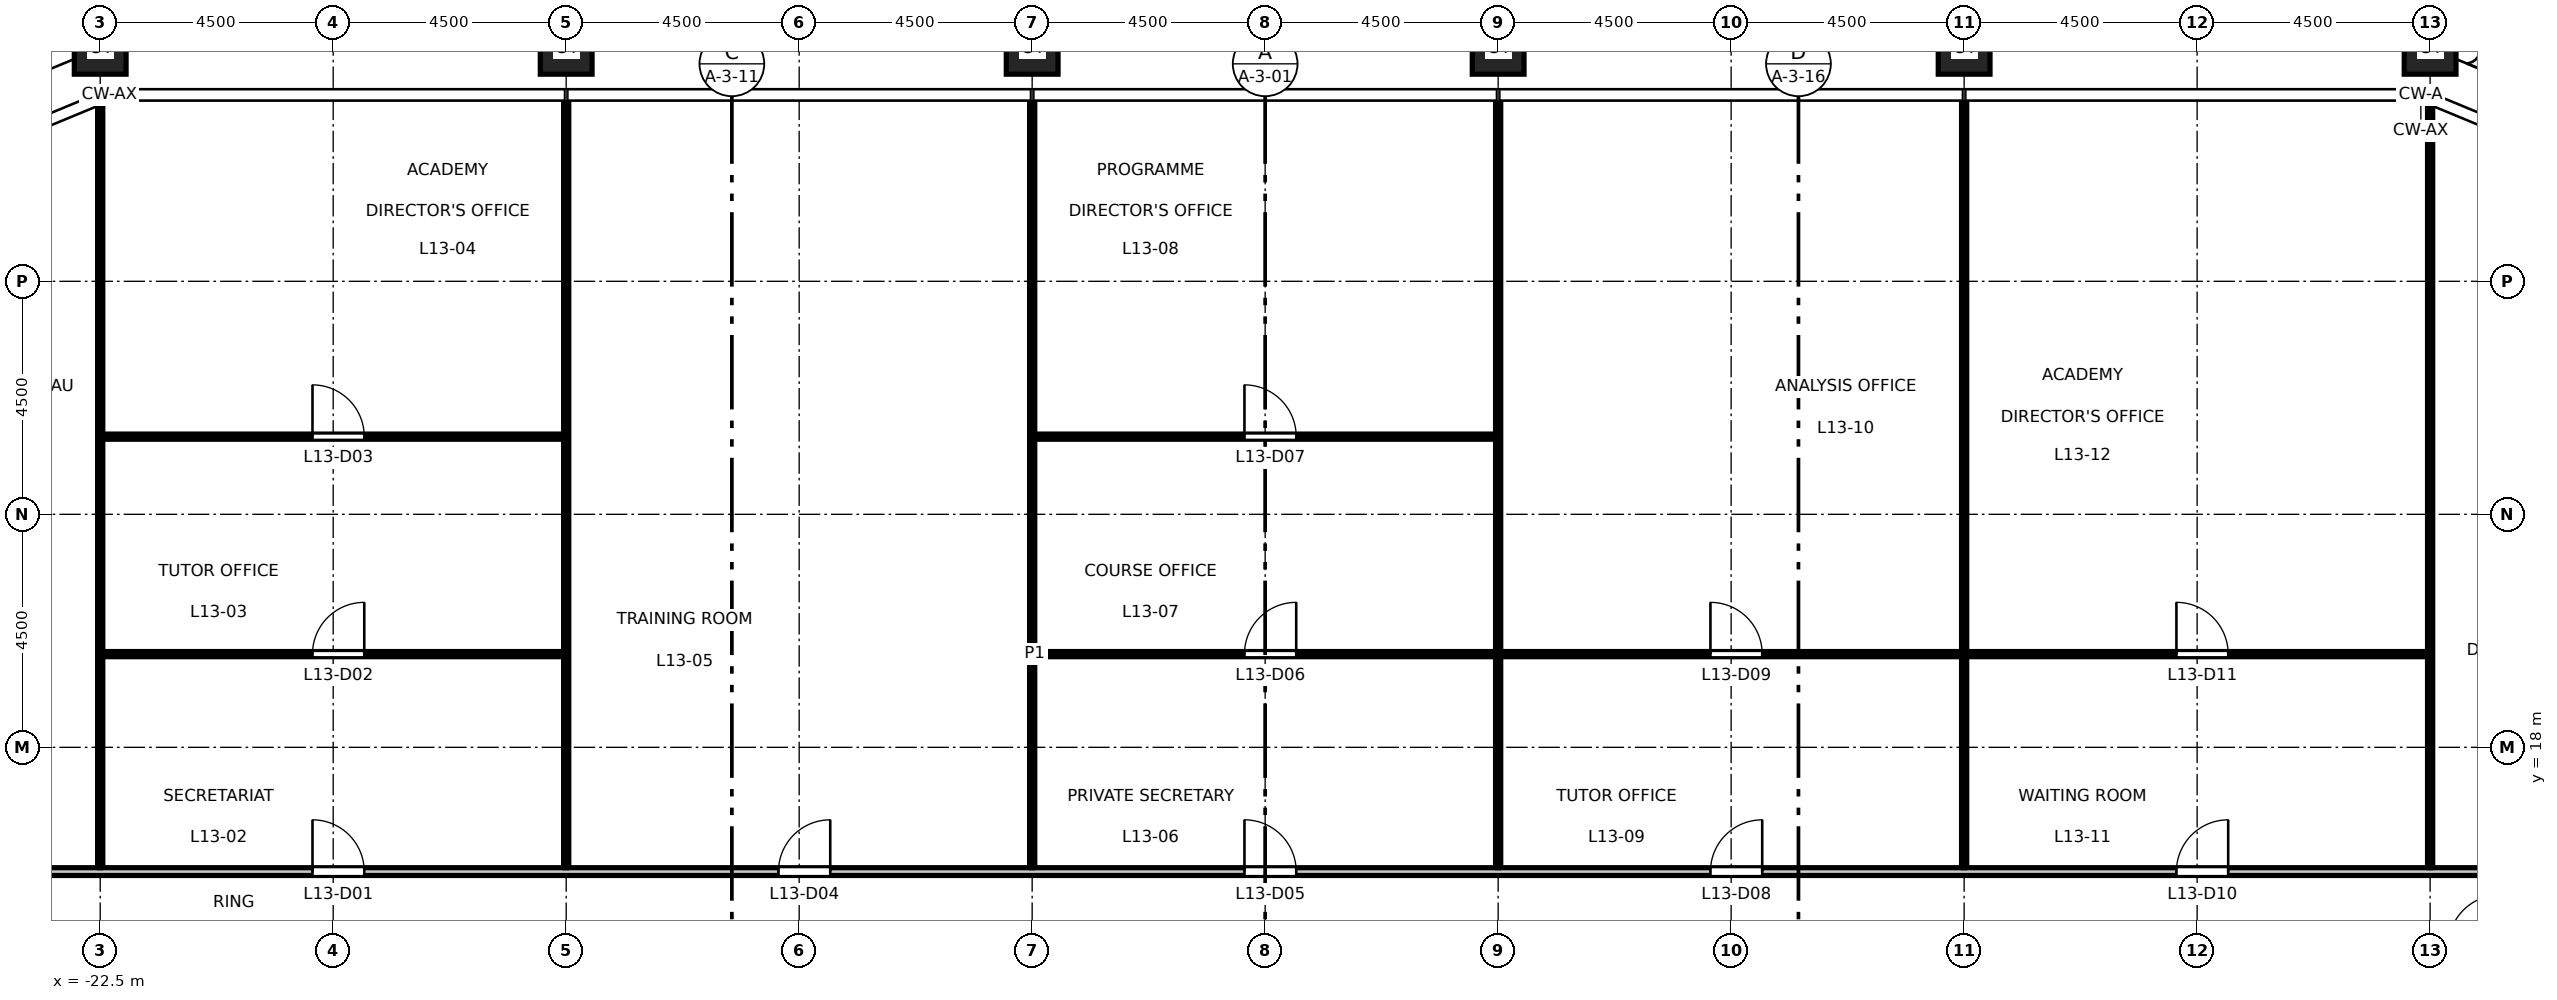
"""IFC4 building model, lengths in metres.
Left out: names, types, materials, properties, quantities, classifications, styles, units other than length and angle.
Written with IfcOpenShell. Run it as: python <this file> out.ifc"""

import sys

from ifc_helpers import new_model, si_unit, direction, frame, frame_2d, origin, origin_2d, place, context, subcontext, project, spatial, rectangle, hollow_rectangle, extrude, element, fill, save


model = new_model("IFC4")
c1 = context("Model", 3, precision=1e-05, world=origin(), true_north=direction((0.0, 1.0)))
c2 = subcontext(c1, "Body", "Model", "MODEL_VIEW")
j1 = project(units=[si_unit("LENGTHUNIT", "METRE"), si_unit("PLANEANGLEUNIT", "RADIAN")], contexts=[c1])
p1 = place(None, origin())
s1 = spatial("IfcSite", under=j1, at=p1, CompositionType="ELEMENT")
p2 = place(p1, origin())
s2 = spatial("IfcBuilding", under=s1, at=p2, CompositionType="ELEMENT")
p3 = place(p2, frame((0.0, 0.0, 62.7)))
s3 = spatial("IfcBuildingStorey", under=s2, at=p3, CompositionType="ELEMENT", Elevation=62.7)
for number, where, z_axis, x_axis in (
    (1, (22.5, 31.5, 0.0), (0.0, 0.0, 1.0), (1.0, 0.0, 0.0)),
    (2, (13.5, 31.5, 0.0), (0.0, 0.0, 1.0), (1.0, 0.0, 0.0)),
    (3, (4.5, 31.5, 0.0), (0.0, 0.0, 1.0), (1.0, 0.0, 0.0)),
    (4, (-4.5, 31.5, 0.0), (0.0, 0.0, 1.0), (1.0, 0.0, 0.0)),
    (5, (-13.5, 31.5, 0.0), (0.0, 0.0, 1.0), (1.0, 0.0, 0.0)),
    (6, (-22.5, 31.5, 0.0), (0.0, 0.0, 1.0), (1.0, 0.0, 0.0)),
):
    element("IfcColumn", number, at=place(p3, frame(where, z_axis=z_axis, x_axis=x_axis)), inside=s3, PredefinedType="COLUMN", context=c2, shape_type="SweptSolid", body=[
        extrude(hollow_rectangle(XDim=1.0, YDim=1.0, WallThickness=0.06, at=origin_2d()), origin(), (0.0, 0.0, 1.0), 4.5),
    ])
p4 = place(p3, frame((-23.925, 15.6, 0.0), z_axis=(0.0, 0.0, 1.0), x_axis=(1.0, 0.0, 0.0)))
e7 = element("IfcWall", 7, at=p4, inside=s3, PredefinedType="PARTITIONING", context=c2, shape_type="SweptSolid", body=[
    extrude(rectangle(XDim=47.85, YDim=0.15, at=frame_2d((23.925, 0.0))), origin(), (0.0, 0.0, 1.0), 4.35),
])
p5 = place(p4, frame((5.525, 0.0, 0.0)))
e8 = element("IfcOpeningElement", 8, at=p5, cuts=e7, PredefinedType="OPENING", context=c2, shape_type="SweptSolid", body=[
    extrude(rectangle(XDim=1.0, YDim=2.1, at=frame_2d((0.5, 1.05))), frame((0.0, 0.085, 0.0), z_axis=(0.0, -1.0, 0.0), x_axis=(1.0, 0.0, 0.0)), (0.0, 0.0, 1.0), 0.17),
])
p6 = place(p4, frame((14.525, 0.0, 0.0)))
e9 = element("IfcOpeningElement", 9, at=p6, cuts=e7, PredefinedType="OPENING", context=c2, shape_type="SweptSolid", body=[
    extrude(rectangle(XDim=1.0, YDim=2.1, at=frame_2d((0.5, 1.05))), frame((0.0, 0.085, 0.0), z_axis=(0.0, -1.0, 0.0), x_axis=(1.0, 0.0, 0.0)), (0.0, 0.0, 1.0), 0.17),
])
p7 = place(p4, frame((23.525, 0.0, 0.0)))
e10 = element("IfcOpeningElement", 10, at=p7, cuts=e7, PredefinedType="OPENING", context=c2, shape_type="SweptSolid", body=[
    extrude(rectangle(XDim=1.0, YDim=2.1, at=frame_2d((0.5, 1.05))), frame((0.0, 0.085, 0.0), z_axis=(0.0, -1.0, 0.0), x_axis=(1.0, 0.0, 0.0)), (0.0, 0.0, 1.0), 0.17),
])
p8 = place(p4, frame((32.525, 0.0, 0.0)))
e11 = element("IfcOpeningElement", 11, at=p8, cuts=e7, PredefinedType="OPENING", context=c2, shape_type="SweptSolid", body=[
    extrude(rectangle(XDim=1.0, YDim=2.1, at=frame_2d((0.5, 1.05))), frame((0.0, 0.085, 0.0), z_axis=(0.0, -1.0, 0.0), x_axis=(1.0, 0.0, 0.0)), (0.0, 0.0, 1.0), 0.17),
])
p9 = place(p4, frame((41.525, 0.0, 0.0)))
e12 = element("IfcOpeningElement", 12, at=p9, cuts=e7, PredefinedType="OPENING", context=c2, shape_type="SweptSolid", body=[
    extrude(rectangle(XDim=1.0, YDim=2.1, at=frame_2d((0.5, 1.05))), frame((0.0, 0.085, 0.0), z_axis=(0.0, -1.0, 0.0), x_axis=(1.0, 0.0, 0.0)), (0.0, 0.0, 1.0), 0.17),
])
p10 = place(p3, frame((-22.45, 19.8, 0.0), z_axis=(0.0, 0.0, 1.0), x_axis=(1.0, 0.0, 0.0)))
e13 = element("IfcWall", 13, at=p10, inside=s3, PredefinedType="PARTITIONING", context=c2, shape_type="SweptSolid", body=[
    extrude(rectangle(XDim=8.9, YDim=0.1, at=frame_2d((4.45, 0.0))), origin(), (0.0, 0.0, 1.0), 4.35),
])
p11 = place(p10, frame((4.05, 0.0, 0.0)))
e14 = element("IfcOpeningElement", 14, at=p11, cuts=e13, PredefinedType="OPENING", context=c2, shape_type="SweptSolid", body=[
    extrude(rectangle(XDim=1.0, YDim=2.1, at=frame_2d((0.5, 1.05))), frame((0.0, 0.06, 0.0), z_axis=(0.0, -1.0, 0.0), x_axis=(1.0, 0.0, 0.0)), (0.0, 0.0, 1.0), 0.12),
])
p12 = place(p3, frame((-4.45, 19.8, 0.0), z_axis=(0.0, 0.0, 1.0), x_axis=(1.0, 0.0, 0.0)))
e15 = element("IfcWall", 15, at=p12, inside=s3, PredefinedType="PARTITIONING", context=c2, shape_type="SweptSolid", body=[
    extrude(rectangle(XDim=26.9, YDim=0.1, at=frame_2d((13.45, 0.0))), origin(), (0.0, 0.0, 1.0), 4.35),
])
p13 = place(p12, frame((4.05, 0.0, 0.0)))
e16 = element("IfcOpeningElement", 16, at=p13, cuts=e15, PredefinedType="OPENING", context=c2, shape_type="SweptSolid", body=[
    extrude(rectangle(XDim=1.0, YDim=2.1, at=frame_2d((0.5, 1.05))), frame((0.0, 0.06, 0.0), z_axis=(0.0, -1.0, 0.0), x_axis=(1.0, 0.0, 0.0)), (0.0, 0.0, 1.0), 0.12),
])
p14 = place(p12, frame((13.05, 0.0, 0.0)))
e17 = element("IfcOpeningElement", 17, at=p14, cuts=e15, PredefinedType="OPENING", context=c2, shape_type="SweptSolid", body=[
    extrude(rectangle(XDim=1.0, YDim=2.1, at=frame_2d((0.5, 1.05))), frame((0.0, 0.06, 0.0), z_axis=(0.0, -1.0, 0.0), x_axis=(1.0, 0.0, 0.0)), (0.0, 0.0, 1.0), 0.12),
])
p15 = place(p12, frame((22.05, 0.0, 0.0)))
e18 = element("IfcOpeningElement", 18, at=p15, cuts=e15, PredefinedType="OPENING", context=c2, shape_type="SweptSolid", body=[
    extrude(rectangle(XDim=1.0, YDim=2.1, at=frame_2d((0.5, 1.05))), frame((0.0, 0.06, 0.0), z_axis=(0.0, -1.0, 0.0), x_axis=(1.0, 0.0, 0.0)), (0.0, 0.0, 1.0), 0.12),
])
p16 = place(p3, frame((-22.45, 24.0, 0.0), z_axis=(0.0, 0.0, 1.0), x_axis=(1.0, 0.0, 0.0)))
e19 = element("IfcWall", 19, at=p16, inside=s3, PredefinedType="PARTITIONING", context=c2, shape_type="SweptSolid", body=[
    extrude(rectangle(XDim=8.9, YDim=0.1, at=frame_2d((4.45, 0.0))), origin(), (0.0, 0.0, 1.0), 3.85),
])
p17 = place(p16, frame((4.05, 0.0, 0.0)))
e20 = element("IfcOpeningElement", 20, at=p17, cuts=e19, PredefinedType="OPENING", context=c2, shape_type="SweptSolid", body=[
    extrude(rectangle(XDim=1.0, YDim=2.1, at=frame_2d((0.5, 1.05))), frame((0.0, 0.06, 0.0), z_axis=(0.0, -1.0, 0.0), x_axis=(1.0, 0.0, 0.0)), (0.0, 0.0, 1.0), 0.12),
])
p18 = place(p3, frame((-4.45, 24.0, 0.0), z_axis=(0.0, 0.0, 1.0), x_axis=(1.0, 0.0, 0.0)))
e21 = element("IfcWall", 21, at=p18, inside=s3, PredefinedType="PARTITIONING", context=c2, shape_type="SweptSolid", body=[
    extrude(rectangle(XDim=8.9, YDim=0.1, at=frame_2d((4.45, 0.0))), origin(), (0.0, 0.0, 1.0), 3.85),
])
p19 = place(p18, frame((4.05, 0.0, 0.0)))
e22 = element("IfcOpeningElement", 22, at=p19, cuts=e21, PredefinedType="OPENING", context=c2, shape_type="SweptSolid", body=[
    extrude(rectangle(XDim=1.0, YDim=2.1, at=frame_2d((0.5, 1.05))), frame((0.0, 0.06, 0.0), z_axis=(0.0, -1.0, 0.0), x_axis=(1.0, 0.0, 0.0)), (0.0, 0.0, 1.0), 0.12),
])
p20 = place(p3, frame((-22.5, 15.675, 0.0), z_axis=(0.0, 0.0, 1.0), x_axis=(0.0, 1.0, 0.0)))
e23 = element("IfcWall", 23, at=p20, inside=s3, PredefinedType="PARTITIONING", context=c2, shape_type="SweptSolid", body=[
    extrude(rectangle(XDim=14.753, YDim=0.1, at=frame_2d((7.376, 0.0))), origin(), (0.0, 0.0, 1.0), 3.35),
])
for number, where, z_axis, x_axis in (
    (24, (-13.5, 15.675, 0.0), (0.0, 0.0, 1.0), (0.0, 1.0, 0.0)),
    (25, (-4.5, 15.675, 0.0), (0.0, 0.0, 1.0), (0.0, 1.0, 0.0)),
):
    element("IfcWall", number, at=place(p3, frame(where, z_axis=z_axis, x_axis=x_axis)), inside=s3, PredefinedType="PARTITIONING", context=c2, shape_type="SweptSolid", body=[
        extrude(rectangle(XDim=14.835, YDim=0.1, at=frame_2d((7.417, 0.0))), origin(), (0.0, 0.0, 1.0), 3.35),
    ])
p21 = place(p3, frame((4.5, 15.675, 0.0), z_axis=(0.0, 0.0, 1.0), x_axis=(0.0, 1.0, 0.0)))
e26 = element("IfcWall", 26, at=p21, inside=s3, PredefinedType="PARTITIONING", context=c2, shape_type="SweptSolid", body=[
    extrude(rectangle(XDim=4.075, YDim=0.1, at=frame_2d((2.038, 0.0))), origin(), (0.0, 0.0, 1.0), 3.35),
])
p22 = place(p3, frame((4.5, 19.85, 0.0), z_axis=(0.0, 0.0, 1.0), x_axis=(0.0, 1.0, 0.0)))
e27 = element("IfcWall", 27, at=p22, inside=s3, PredefinedType="PARTITIONING", context=c2, shape_type="SweptSolid", body=[
    extrude(rectangle(XDim=10.66, YDim=0.1, at=frame_2d((5.33, 0.0))), origin(), (0.0, 0.0, 1.0), 3.35),
])
p23 = place(p3, frame((13.5, 15.675, 0.0), z_axis=(0.0, 0.0, 1.0), x_axis=(0.0, 1.0, 0.0)))
e28 = element("IfcWall", 28, at=p23, inside=s3, PredefinedType="PARTITIONING", context=c2, shape_type="SweptSolid", body=[
    extrude(rectangle(XDim=4.075, YDim=0.1, at=frame_2d((2.038, 0.0))), origin(), (0.0, 0.0, 1.0), 3.35),
])
p24 = place(p3, frame((13.5, 19.85, 0.0), z_axis=(0.0, 0.0, 1.0), x_axis=(0.0, 1.0, 0.0)))
e29 = element("IfcWall", 29, at=p24, inside=s3, PredefinedType="PARTITIONING", context=c2, shape_type="SweptSolid", body=[
    extrude(rectangle(XDim=10.66, YDim=0.1, at=frame_2d((5.33, 0.0))), origin(), (0.0, 0.0, 1.0), 3.35),
])
p25 = place(p3, frame((22.5, 15.675, 0.0), z_axis=(0.0, 0.0, 1.0), x_axis=(0.0, 1.0, 0.0)))
e30 = element("IfcWall", 30, at=p25, inside=s3, PredefinedType="PARTITIONING", context=c2, shape_type="SweptSolid", body=[
    extrude(rectangle(XDim=14.753, YDim=0.1, at=frame_2d((7.376, 0.0))), origin(), (0.0, 0.0, 1.0), 3.35),
])
p26 = place(p5, origin())
e31 = element("IfcDoor", 31, at=p26, inside=s3, OperationType="SINGLE_SWING_LEFT", PredefinedType="DOOR", context=c2, shape_type="SweptSolid", body=[
    extrude(rectangle(XDim=1.0, YDim=2.1, at=frame_2d((0.5, 1.05))), frame((0.0, 0.025, 0.0), z_axis=(0.0, -1.0, 0.0), x_axis=(1.0, 0.0, 0.0)), (0.0, 0.0, 1.0), 0.05),
])
fill(e8, e31)
p27 = place(p11, origin())
e32 = element("IfcDoor", 32, at=p27, inside=s3, OperationType="SINGLE_SWING_RIGHT", PredefinedType="DOOR", context=c2, shape_type="SweptSolid", body=[
    extrude(rectangle(XDim=1.0, YDim=2.1, at=frame_2d((0.5, 1.05))), frame((0.0, 0.025, 0.0), z_axis=(0.0, -1.0, 0.0), x_axis=(1.0, 0.0, 0.0)), (0.0, 0.0, 1.0), 0.05),
])
fill(e14, e32)
p28 = place(p17, origin())
e33 = element("IfcDoor", 33, at=p28, inside=s3, OperationType="SINGLE_SWING_LEFT", PredefinedType="DOOR", context=c2, shape_type="SweptSolid", body=[
    extrude(rectangle(XDim=1.0, YDim=2.1, at=frame_2d((0.5, 1.05))), frame((0.0, 0.025, 0.0), z_axis=(0.0, -1.0, 0.0), x_axis=(1.0, 0.0, 0.0)), (0.0, 0.0, 1.0), 0.05),
])
fill(e20, e33)
p29 = place(p6, origin())
e34 = element("IfcDoor", 34, at=p29, inside=s3, OperationType="SINGLE_SWING_RIGHT", PredefinedType="DOOR", context=c2, shape_type="SweptSolid", body=[
    extrude(rectangle(XDim=1.0, YDim=2.1, at=frame_2d((0.5, 1.05))), frame((0.0, 0.025, 0.0), z_axis=(0.0, -1.0, 0.0), x_axis=(1.0, 0.0, 0.0)), (0.0, 0.0, 1.0), 0.05),
])
fill(e9, e34)
p30 = place(p7, origin())
e35 = element("IfcDoor", 35, at=p30, inside=s3, OperationType="SINGLE_SWING_LEFT", PredefinedType="DOOR", context=c2, shape_type="SweptSolid", body=[
    extrude(rectangle(XDim=1.0, YDim=2.1, at=frame_2d((0.5, 1.05))), frame((0.0, 0.025, 0.0), z_axis=(0.0, -1.0, 0.0), x_axis=(1.0, 0.0, 0.0)), (0.0, 0.0, 1.0), 0.05),
])
fill(e10, e35)
p31 = place(p13, origin())
e36 = element("IfcDoor", 36, at=p31, inside=s3, OperationType="SINGLE_SWING_RIGHT", PredefinedType="DOOR", context=c2, shape_type="SweptSolid", body=[
    extrude(rectangle(XDim=1.0, YDim=2.1, at=frame_2d((0.5, 1.05))), frame((0.0, 0.025, 0.0), z_axis=(0.0, -1.0, 0.0), x_axis=(1.0, 0.0, 0.0)), (0.0, 0.0, 1.0), 0.05),
])
fill(e16, e36)
p32 = place(p19, origin())
e37 = element("IfcDoor", 37, at=p32, inside=s3, OperationType="SINGLE_SWING_LEFT", PredefinedType="DOOR", context=c2, shape_type="SweptSolid", body=[
    extrude(rectangle(XDim=1.0, YDim=2.1, at=frame_2d((0.5, 1.05))), frame((0.0, 0.025, 0.0), z_axis=(0.0, -1.0, 0.0), x_axis=(1.0, 0.0, 0.0)), (0.0, 0.0, 1.0), 0.05),
])
fill(e22, e37)
p33 = place(p8, origin())
e38 = element("IfcDoor", 38, at=p33, inside=s3, OperationType="SINGLE_SWING_RIGHT", PredefinedType="DOOR", context=c2, shape_type="SweptSolid", body=[
    extrude(rectangle(XDim=1.0, YDim=2.1, at=frame_2d((0.5, 1.05))), frame((0.0, 0.025, 0.0), z_axis=(0.0, -1.0, 0.0), x_axis=(1.0, 0.0, 0.0)), (0.0, 0.0, 1.0), 0.05),
])
fill(e11, e38)
p34 = place(p14, origin())
e39 = element("IfcDoor", 39, at=p34, inside=s3, OperationType="SINGLE_SWING_LEFT", PredefinedType="DOOR", context=c2, shape_type="SweptSolid", body=[
    extrude(rectangle(XDim=1.0, YDim=2.1, at=frame_2d((0.5, 1.05))), frame((0.0, 0.025, 0.0), z_axis=(0.0, -1.0, 0.0), x_axis=(1.0, 0.0, 0.0)), (0.0, 0.0, 1.0), 0.05),
])
fill(e17, e39)
p35 = place(p9, origin())
e40 = element("IfcDoor", 40, at=p35, inside=s3, OperationType="SINGLE_SWING_RIGHT", PredefinedType="DOOR", context=c2, shape_type="SweptSolid", body=[
    extrude(rectangle(XDim=1.0, YDim=2.1, at=frame_2d((0.5, 1.05))), frame((0.0, 0.025, 0.0), z_axis=(0.0, -1.0, 0.0), x_axis=(1.0, 0.0, 0.0)), (0.0, 0.0, 1.0), 0.05),
])
fill(e12, e40)
p36 = place(p15, origin())
e41 = element("IfcDoor", 41, at=p36, inside=s3, OperationType="SINGLE_SWING_LEFT", PredefinedType="DOOR", context=c2, shape_type="SweptSolid", body=[
    extrude(rectangle(XDim=1.0, YDim=2.1, at=frame_2d((0.5, 1.05))), frame((0.0, 0.025, 0.0), z_axis=(0.0, -1.0, 0.0), x_axis=(1.0, 0.0, 0.0)), (0.0, 0.0, 1.0), 0.05),
])
fill(e18, e41)
save(model, sys.argv[1])
